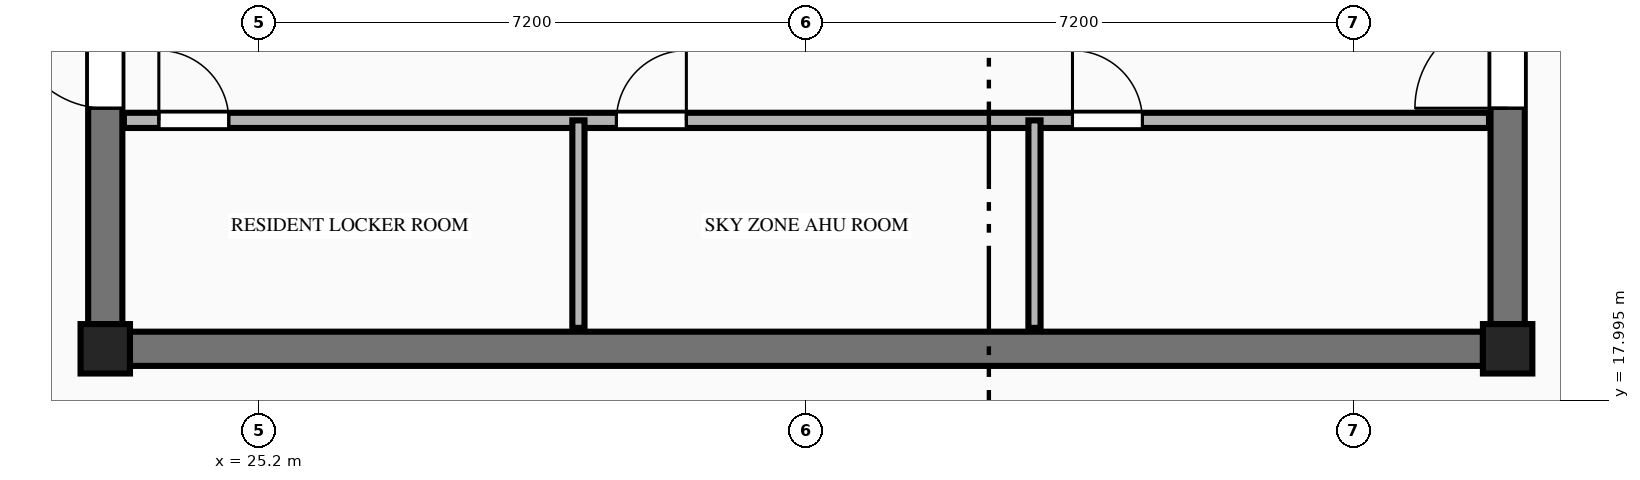
"""IFC4 building model, lengths in metres.
Left out: names, types, materials, properties, quantities, classifications, styles, units other than length and angle.
Written with IfcOpenShell. Run it as: python <this file> out.ifc"""

import sys

from ifc_helpers import new_model, si_unit, direction, frame, frame_2d, origin, origin_2d, place, context, subcontext, project, spatial, rectangle, extrude, element, fill, save


model = new_model("IFC4")
c1 = context("Model", 3, precision=1e-05, world=origin(), true_north=direction((0.0, 1.0)))
c2 = subcontext(c1, "Body", "Model", "MODEL_VIEW")
j1 = project(units=[si_unit("LENGTHUNIT", "METRE"), si_unit("PLANEANGLEUNIT", "RADIAN")], contexts=[c1])
p1 = place(None, origin())
s1 = spatial("IfcSite", under=j1, at=p1, CompositionType="ELEMENT")
p2 = place(p1, origin())
s2 = spatial("IfcBuilding", under=s1, at=p2, CompositionType="ELEMENT")
p3 = place(p2, frame((0.0, 0.0, 274.45)))
s3 = spatial("IfcBuildingStorey", under=s2, at=p3, CompositionType="ELEMENT", Elevation=274.45)
for number, where, z_axis, x_axis in (
    (1, (23.175, 18.675, 0.0), (0.0, 0.0, 1.0), (1.0, 0.0, 0.0)),
    (2, (41.625, 18.675, 0.0), (0.0, 0.0, 1.0), (1.0, 0.0, 0.0)),
):
    element("IfcColumn", number, at=place(p3, frame(where, z_axis=z_axis, x_axis=x_axis)), inside=s3, PredefinedType="COLUMN", context=c2, shape_type="SweptSolid", body=[
        extrude(rectangle(XDim=0.65, YDim=0.65, at=origin_2d()), origin(), (0.0, 0.0, 1.0), 3.65),
    ])
p4 = place(p3, frame((23.5, 18.675, 0.0), z_axis=(0.0, 0.0, 1.0), x_axis=(1.0, 0.0, 0.0)))
e3 = element("IfcWall", 3, at=p4, inside=s3, PredefinedType="SHEAR", context=c2, shape_type="SweptSolid", body=[
    extrude(rectangle(XDim=17.8, YDim=0.45, at=frame_2d((8.9, 0.0))), origin(), (0.0, 0.0, 1.0), 3.37),
])
p5 = place(p3, frame((23.175, 19.0, 0.0), z_axis=(0.0, 0.0, 1.0), x_axis=(0.0, 1.0, 0.0)))
e4 = element("IfcWall", 4, at=p5, inside=s3, PredefinedType="SHEAR", context=c2, shape_type="SweptSolid", body=[
    extrude(rectangle(XDim=13.8, YDim=0.45, at=frame_2d((6.9, 0.0))), origin(), (0.0, 0.0, 1.0), 3.37),
])
p6 = place(p5, frame((2.84, 0.0, 0.0)))
e5 = element("IfcOpeningElement", 5, at=p6, cuts=e4, PredefinedType="OPENING", context=c2, shape_type="SweptSolid", body=[
    extrude(rectangle(XDim=1.22, YDim=2.25, at=frame_2d((0.61, 1.125))), frame((0.0, 0.235, 0.0), z_axis=(0.0, -1.0, 0.0), x_axis=(1.0, 0.0, 0.0)), (0.0, 0.0, 1.0), 0.47),
])
p7 = place(p3, frame((41.625, 19.0, 0.0), z_axis=(0.0, 0.0, 1.0), x_axis=(0.0, 1.0, 0.0)))
e6 = element("IfcWall", 6, at=p7, inside=s3, PredefinedType="SHEAR", context=c2, shape_type="SweptSolid", body=[
    extrude(rectangle(XDim=13.8, YDim=0.45, at=frame_2d((6.9, 0.0))), origin(), (0.0, 0.0, 1.0), 3.37),
])
p8 = place(p7, frame((2.84, 0.0, 0.0)))
e7 = element("IfcOpeningElement", 7, at=p8, cuts=e6, PredefinedType="OPENING", context=c2, shape_type="SweptSolid", body=[
    extrude(rectangle(XDim=1.22, YDim=2.25, at=frame_2d((0.61, 1.125))), frame((0.0, 0.235, 0.0), z_axis=(0.0, -1.0, 0.0), x_axis=(1.0, 0.0, 0.0)), (0.0, 0.0, 1.0), 0.47),
])
p9 = place(p3, frame((23.42, 21.68, 0.0), z_axis=(0.0, 0.0, 1.0), x_axis=(1.0, 0.0, 0.0)))
e8 = element("IfcWall", 8, at=p9, inside=s3, PredefinedType="PLUMBINGWALL", context=c2, shape_type="SweptSolid", body=[
    extrude(rectangle(XDim=17.96, YDim=0.2, at=frame_2d((8.98, 0.0))), origin(), (0.0, 0.0, 1.0), 3.37),
])
p10 = place(p9, frame((0.46, 0.0, 0.0)))
e9 = element("IfcOpeningElement", 9, at=p10, cuts=e8, PredefinedType="OPENING", context=c2, shape_type="SweptSolid", body=[
    extrude(rectangle(XDim=0.92, YDim=2.15, at=frame_2d((0.46, 1.075))), frame((0.0, 0.11, 0.0), z_axis=(0.0, -1.0, 0.0), x_axis=(1.0, 0.0, 0.0)), (0.0, 0.0, 1.0), 0.22),
])
p11 = place(p9, frame((6.48, 0.0, 0.0)))
e10 = element("IfcOpeningElement", 10, at=p11, cuts=e8, PredefinedType="OPENING", context=c2, shape_type="SweptSolid", body=[
    extrude(rectangle(XDim=0.92, YDim=2.15, at=frame_2d((0.46, 1.075))), frame((0.0, 0.11, 0.0), z_axis=(0.0, -1.0, 0.0), x_axis=(1.0, 0.0, 0.0)), (0.0, 0.0, 1.0), 0.22),
])
p12 = place(p9, frame((12.48, 0.0, 0.0)))
e11 = element("IfcOpeningElement", 11, at=p12, cuts=e8, PredefinedType="OPENING", context=c2, shape_type="SweptSolid", body=[
    extrude(rectangle(XDim=0.92, YDim=2.15, at=frame_2d((0.46, 1.075))), frame((0.0, 0.11, 0.0), z_axis=(0.0, -1.0, 0.0), x_axis=(1.0, 0.0, 0.0)), (0.0, 0.0, 1.0), 0.22),
])
for number, where, z_axis, x_axis in (
    (12, (29.4, 18.95, 0.0), (0.0, 0.0, 1.0), (0.0, 1.0, 0.0)),
    (13, (35.4, 18.95, 0.0), (0.0, 0.0, 1.0), (0.0, 1.0, 0.0)),
):
    element("IfcWall", number, at=place(p3, frame(where, z_axis=z_axis, x_axis=x_axis)), inside=s3, PredefinedType="PARTITIONING", context=c2, shape_type="SweptSolid", body=[
        extrude(rectangle(XDim=2.73, YDim=0.16, at=frame_2d((1.365, 0.0))), origin(), (0.0, 0.0, 1.0), 3.37),
    ])
p13 = place(p6, origin())
e14 = element("IfcDoor", 14, at=p13, inside=s3, OperationType="SINGLE_SWING_RIGHT", PredefinedType="DOOR", context=c2, shape_type="SweptSolid", body=[
    extrude(rectangle(XDim=1.22, YDim=2.25, at=frame_2d((0.61, 1.125))), frame((0.0, 0.025, 0.0), z_axis=(0.0, -1.0, 0.0), x_axis=(1.0, 0.0, 0.0)), (0.0, 0.0, 1.0), 0.05),
])
fill(e5, e14)
p14 = place(p8, origin())
e15 = element("IfcDoor", 15, at=p14, inside=s3, OperationType="SINGLE_SWING_LEFT", PredefinedType="DOOR", context=c2, shape_type="SweptSolid", body=[
    extrude(rectangle(XDim=1.22, YDim=2.25, at=frame_2d((0.61, 1.125))), frame((0.0, 0.025, 0.0), z_axis=(0.0, -1.0, 0.0), x_axis=(1.0, 0.0, 0.0)), (0.0, 0.0, 1.0), 0.05),
])
fill(e7, e15)
p15 = place(p10, origin())
e16 = element("IfcDoor", 16, at=p15, inside=s3, OperationType="SINGLE_SWING_LEFT", PredefinedType="DOOR", context=c2, shape_type="SweptSolid", body=[
    extrude(rectangle(XDim=0.92, YDim=2.15, at=frame_2d((0.46, 1.075))), frame((0.0, 0.025, 0.0), z_axis=(0.0, -1.0, 0.0), x_axis=(1.0, 0.0, 0.0)), (0.0, 0.0, 1.0), 0.05),
])
fill(e9, e16)
p16 = place(p11, origin())
e17 = element("IfcDoor", 17, at=p16, inside=s3, OperationType="SINGLE_SWING_RIGHT", PredefinedType="DOOR", context=c2, shape_type="SweptSolid", body=[
    extrude(rectangle(XDim=0.92, YDim=2.15, at=frame_2d((0.46, 1.075))), frame((0.0, 0.025, 0.0), z_axis=(0.0, -1.0, 0.0), x_axis=(1.0, 0.0, 0.0)), (0.0, 0.0, 1.0), 0.05),
])
fill(e10, e17)
p17 = place(p12, origin())
e18 = element("IfcDoor", 18, at=p17, inside=s3, OperationType="SINGLE_SWING_LEFT", PredefinedType="DOOR", context=c2, shape_type="SweptSolid", body=[
    extrude(rectangle(XDim=0.92, YDim=2.15, at=frame_2d((0.46, 1.075))), frame((0.0, 0.025, 0.0), z_axis=(0.0, -1.0, 0.0), x_axis=(1.0, 0.0, 0.0)), (0.0, 0.0, 1.0), 0.05),
])
fill(e11, e18)
save(model, sys.argv[1])
